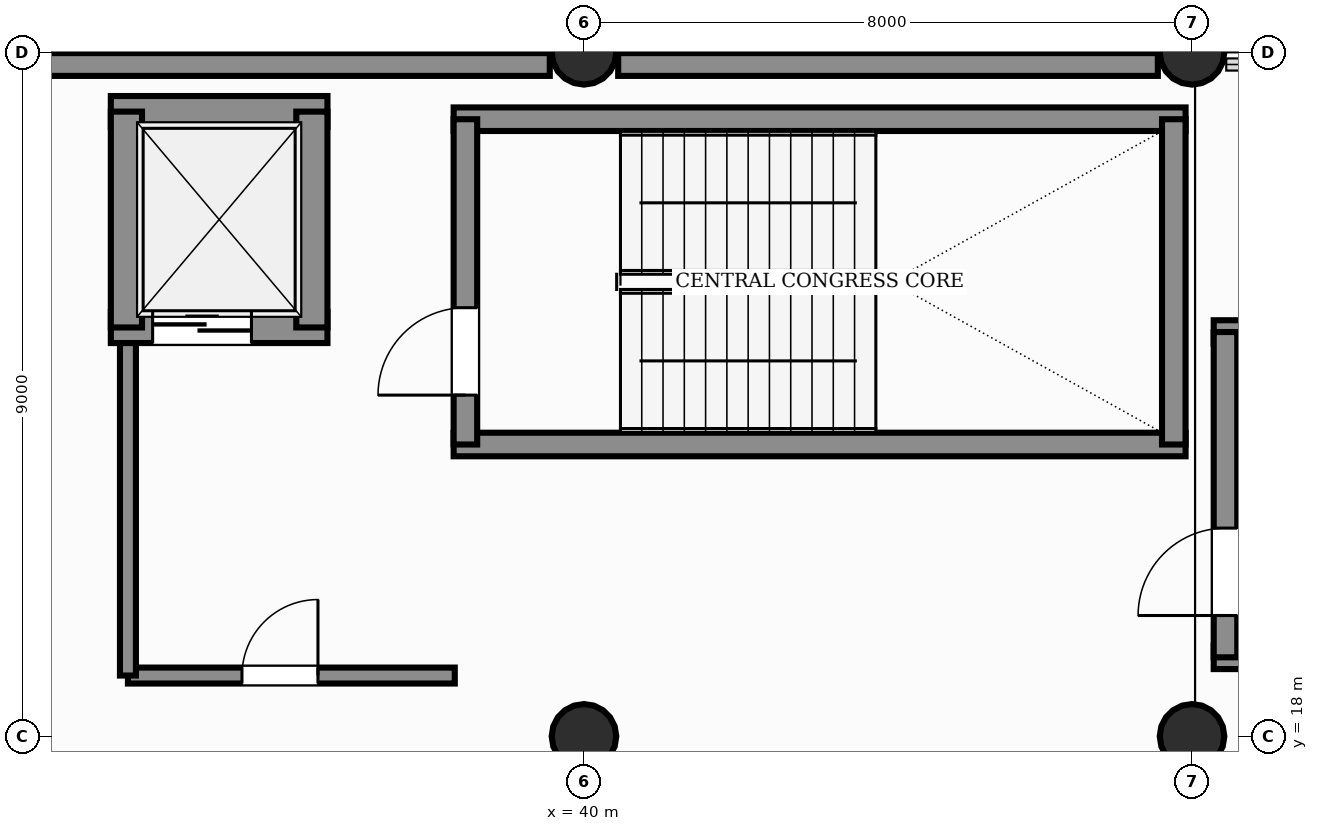
"""IFC4 building model, lengths in metres.
Left out: names, types, materials, properties, quantities, classifications, styles, units other than length and angle.
Written with IfcOpenShell. Run it as: python <this file> out.ifc"""

import sys

from ifc_helpers import new_model, si_unit, direction, frame, frame_2d, origin, origin_2d, place, context, subcontext, project, spatial, rectangle, circle, extrude, element, fill, save


model = new_model("IFC4")
c1 = context("Model", 3, precision=1e-05, world=origin(), true_north=direction((0.0, 1.0)))
c2 = subcontext(c1, "Body", "Model", "MODEL_VIEW")
j1 = project(units=[si_unit("LENGTHUNIT", "METRE"), si_unit("PLANEANGLEUNIT", "RADIAN")], contexts=[c1])
p1 = place(None, origin())
s1 = spatial("IfcSite", under=j1, at=p1, CompositionType="ELEMENT")
p2 = place(p1, origin())
s2 = spatial("IfcBuilding", under=s1, at=p2, CompositionType="ELEMENT")
p3 = place(p2, frame((0.0, 0.0, 11.4)))
s3 = spatial("IfcBuildingStorey", under=s2, at=p3, CompositionType="ELEMENT", Elevation=11.4)
for number, where, z_axis, x_axis in (
    (1, (40.0, 18.0, 0.0), (0.0, 0.0, 1.0), (1.0, 0.0, 0.0)),
    (2, (40.0, 27.0, 0.0), (0.0, 0.0, 1.0), (1.0, 0.0, 0.0)),
    (3, (48.0, 18.0, 0.0), (0.0, 0.0, 1.0), (1.0, 0.0, 0.0)),
    (4, (48.0, 27.0, 0.0), (0.0, 0.0, 1.0), (1.0, 0.0, 0.0)),
):
    element("IfcColumn", number, at=place(p3, frame(where, z_axis=z_axis, x_axis=x_axis)), inside=s3, PredefinedType="COLUMN", context=c2, shape_type="SweptSolid", body=[
        extrude(circle(Radius=0.425, at=origin_2d()), origin(), (0.0, 0.0, 1.0), 4.8),
    ])
for number, where, z_axis, x_axis in (
    (5, (32.45, 26.84, 0.0), (0.0, 0.0, 1.0), (1.0, 0.0, 0.0)),
    (6, (40.45, 26.84, 0.0), (0.0, 0.0, 1.0), (1.0, 0.0, 0.0)),
):
    element("IfcWall", number, at=place(p3, frame(where, z_axis=z_axis, x_axis=x_axis)), inside=s3, PredefinedType="SOLIDWALL", context=c2, shape_type="SweptSolid", body=[
        extrude(rectangle(XDim=7.1, YDim=0.3, at=frame_2d((3.55, 0.0))), origin(), (0.0, 0.0, 1.0), 3.59),
    ])
for number, where, z_axis, x_axis in (
    (7, (38.285, 21.84, 0.0), (0.0, 0.0, 1.0), (1.0, 0.0, 0.0)),
    (8, (38.285, 26.12, 0.0), (0.0, 0.0, 1.0), (1.0, 0.0, 0.0)),
):
    element("IfcWall", number, at=place(p3, frame(where, z_axis=z_axis, x_axis=x_axis)), inside=s3, PredefinedType="SHEAR", context=c2, shape_type="SweptSolid", body=[
        extrude(rectangle(XDim=9.63, YDim=0.31, at=frame_2d((4.815, 0.0))), origin(), (0.0, 0.0, 1.0), 4.8),
    ])
p4 = place(p3, frame((38.44, 21.84, 0.0), z_axis=(0.0, 0.0, 1.0), x_axis=(0.0, 1.0, 0.0)))
e9 = element("IfcWall", 9, at=p4, inside=s3, PredefinedType="SHEAR", context=c2, shape_type="SweptSolid", body=[
    extrude(rectangle(XDim=4.28, YDim=0.31, at=frame_2d((2.14, 0.0))), origin(), (0.0, 0.0, 1.0), 4.8),
])
p5 = place(p4, frame((0.65, 0.0, 0.0)))
e10 = element("IfcOpeningElement", 10, at=p5, cuts=e9, PredefinedType="OPENING", context=c2, shape_type="SweptSolid", body=[
    extrude(rectangle(XDim=1.15, YDim=2.2, at=frame_2d((0.575, 1.1))), frame((0.0, 0.165, 0.0), z_axis=(0.0, -1.0, 0.0), x_axis=(1.0, 0.0, 0.0)), (0.0, 0.0, 1.0), 0.33),
])
p6 = place(p3, frame((47.76, 21.84, 0.0), z_axis=(0.0, 0.0, 1.0), x_axis=(0.0, 1.0, 0.0)))
e11 = element("IfcWall", 11, at=p6, inside=s3, PredefinedType="SHEAR", context=c2, shape_type="SweptSolid", body=[
    extrude(rectangle(XDim=4.28, YDim=0.31, at=frame_2d((2.14, 0.0))), origin(), (0.0, 0.0, 1.0), 4.8),
])
p7 = place(p3, frame((34.0, 18.8, 0.0), z_axis=(0.0, 0.0, 1.0), x_axis=(1.0, 0.0, 0.0)))
e12 = element("IfcWall", 12, at=p7, inside=s3, PredefinedType="PARTITIONING", context=c2, shape_type="SweptSolid", body=[
    extrude(rectangle(XDim=4.3, YDim=0.21, at=frame_2d((2.15, 0.0))), origin(), (0.0, 0.0, 1.0), 3.4),
])
p8 = place(p7, frame((1.5, 0.0, 0.0)))
e13 = element("IfcOpeningElement", 13, at=p8, cuts=e12, PredefinedType="OPENING", context=c2, shape_type="SweptSolid", body=[
    extrude(rectangle(XDim=1.0, YDim=2.15, at=frame_2d((0.5, 1.075))), frame((0.0, 0.115, 0.0), z_axis=(0.0, -1.0, 0.0), x_axis=(1.0, 0.0, 0.0)), (0.0, 0.0, 1.0), 0.23),
])
p9 = place(p3, frame((34.0, 18.8, 0.0), z_axis=(0.0, 0.0, 1.0), x_axis=(0.0, 1.0, 0.0)))
e14 = element("IfcWall", 14, at=p9, inside=s3, PredefinedType="PARTITIONING", context=c2, shape_type="SweptSolid", body=[
    extrude(rectangle(XDim=4.6, YDim=0.21, at=frame_2d((2.3, 0.0))), origin(), (0.0, 0.0, 1.0), 3.4),
])
p10 = place(p3, frame((33.775, 23.38, 0.0), z_axis=(0.0, 0.0, 1.0), x_axis=(1.0, 0.0, 0.0)))
e15 = element("IfcWall", 15, at=p10, inside=s3, PredefinedType="SHEAR", context=c2, shape_type="SweptSolid", body=[
    extrude(rectangle(XDim=2.85, YDim=0.41, at=frame_2d((1.425, 0.0))), origin(), (0.0, 0.0, 1.0), 4.8),
])
p11 = place(p10, frame((0.55, 0.0, 0.0)))
e16 = element("IfcOpeningElement", 16, at=p11, cuts=e15, PredefinedType="OPENING", context=c2, shape_type="SweptSolid", body=[
    extrude(rectangle(XDim=1.3, YDim=2.25, at=frame_2d((0.65, 1.125))), frame((0.0, 0.215, 0.0), z_axis=(0.0, -1.0, 0.0), x_axis=(1.0, 0.0, 0.0)), (0.0, 0.0, 1.0), 0.43),
])
p12 = place(p3, frame((33.775, 26.22, 0.0), z_axis=(0.0, 0.0, 1.0), x_axis=(1.0, 0.0, 0.0)))
e17 = element("IfcWall", 17, at=p12, inside=s3, PredefinedType="SHEAR", context=c2, shape_type="SweptSolid", body=[
    extrude(rectangle(XDim=2.85, YDim=0.41, at=frame_2d((1.425, 0.0))), origin(), (0.0, 0.0, 1.0), 4.8),
])
for number, where, z_axis, x_axis in (
    (18, (33.98, 23.38, 0.0), (0.0, 0.0, 1.0), (0.0, 1.0, 0.0)),
    (19, (36.42, 23.38, 0.0), (0.0, 0.0, 1.0), (0.0, 1.0, 0.0)),
):
    element("IfcWall", number, at=place(p3, frame(where, z_axis=z_axis, x_axis=x_axis)), inside=s3, PredefinedType="SHEAR", context=c2, shape_type="SweptSolid", body=[
        extrude(rectangle(XDim=2.84, YDim=0.41, at=frame_2d((1.42, 0.0))), origin(), (0.0, 0.0, 1.0), 4.8),
    ])
for number, where, z_axis, x_axis in (
    (20, (48.285, 19.04, 0.0), (0.0, 0.0, 1.0), (1.0, 0.0, 0.0)),
    (21, (48.285, 23.32, 0.0), (0.0, 0.0, 1.0), (1.0, 0.0, 0.0)),
):
    element("IfcWall", number, at=place(p3, frame(where, z_axis=z_axis, x_axis=x_axis)), inside=s3, PredefinedType="SHEAR", context=c2, shape_type="SweptSolid", body=[
        extrude(rectangle(XDim=9.63, YDim=0.31, at=frame_2d((4.815, 0.0))), origin(), (0.0, 0.0, 1.0), 4.8),
    ])
p13 = place(p3, frame((48.44, 19.04, 0.0), z_axis=(0.0, 0.0, 1.0), x_axis=(0.0, 1.0, 0.0)))
e22 = element("IfcWall", 22, at=p13, inside=s3, PredefinedType="SHEAR", context=c2, shape_type="SweptSolid", body=[
    extrude(rectangle(XDim=4.28, YDim=0.31, at=frame_2d((2.14, 0.0))), origin(), (0.0, 0.0, 1.0), 4.8),
])
p14 = place(p13, frame((0.55, 0.0, 0.0)))
e23 = element("IfcOpeningElement", 23, at=p14, cuts=e22, PredefinedType="OPENING", context=c2, shape_type="SweptSolid", body=[
    extrude(rectangle(XDim=1.15, YDim=2.2, at=frame_2d((0.575, 1.1))), frame((0.0, 0.165, 0.0), z_axis=(0.0, -1.0, 0.0), x_axis=(1.0, 0.0, 0.0)), (0.0, 0.0, 1.0), 0.33),
])
p15 = place(p5, origin())
e24 = element("IfcDoor", 24, at=p15, inside=s3, OperationType="SINGLE_SWING_LEFT", PredefinedType="DOOR", context=c2, shape_type="SweptSolid", body=[
    extrude(rectangle(XDim=1.15, YDim=2.2, at=frame_2d((0.575, 1.1))), frame((0.0, 0.025, 0.0), z_axis=(0.0, -1.0, 0.0), x_axis=(1.0, 0.0, 0.0)), (0.0, 0.0, 1.0), 0.05),
])
fill(e10, e24)
p16 = place(p8, origin())
e25 = element("IfcDoor", 25, at=p16, inside=s3, OperationType="SINGLE_SWING_RIGHT", PredefinedType="DOOR", context=c2, shape_type="SweptSolid", body=[
    extrude(rectangle(XDim=1.0, YDim=2.15, at=frame_2d((0.5, 1.075))), frame((0.0, 0.025, 0.0), z_axis=(0.0, -1.0, 0.0), x_axis=(1.0, 0.0, 0.0)), (0.0, 0.0, 1.0), 0.05),
])
fill(e13, e25)
p17 = place(p11, origin())
e26 = element("IfcDoor", 26, at=p17, inside=s3, OperationType="DOUBLE_DOOR_SLIDING", PredefinedType="DOOR", context=c2, shape_type="SweptSolid", body=[
    extrude(rectangle(XDim=1.3, YDim=2.25, at=frame_2d((0.65, 1.125))), frame((0.0, 0.025, 0.0), z_axis=(0.0, -1.0, 0.0), x_axis=(1.0, 0.0, 0.0)), (0.0, 0.0, 1.0), 0.05),
])
fill(e16, e26)
p18 = place(p14, origin())
e27 = element("IfcDoor", 27, at=p18, inside=s3, OperationType="SINGLE_SWING_LEFT", PredefinedType="DOOR", context=c2, shape_type="SweptSolid", body=[
    extrude(rectangle(XDim=1.15, YDim=2.2, at=frame_2d((0.575, 1.1))), frame((0.0, 0.025, 0.0), z_axis=(0.0, -1.0, 0.0), x_axis=(1.0, 0.0, 0.0)), (0.0, 0.0, 1.0), 0.05),
])
fill(e23, e27)
save(model, sys.argv[1])
